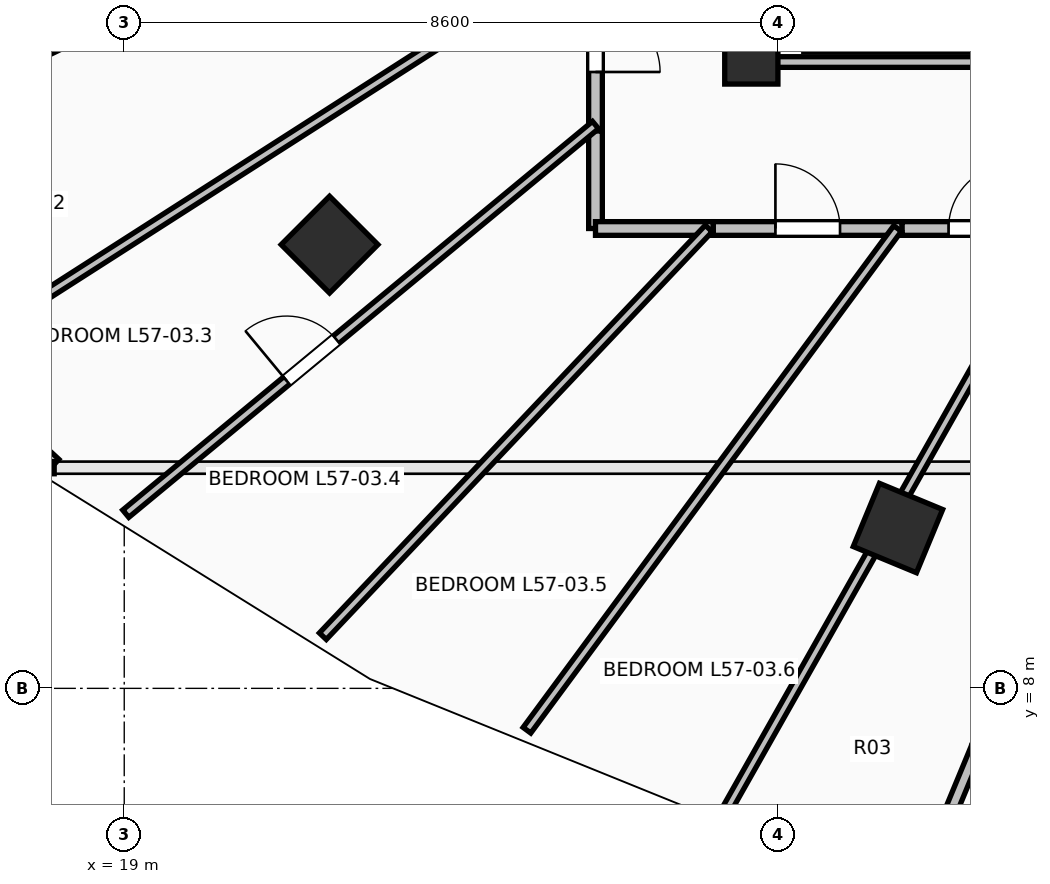
"""IFC4 building model, lengths in metres.
Left out: names, types, materials, properties, quantities, classifications, styles, units other than length and angle.
Written with IfcOpenShell. Run it as: python <this file> out.ifc"""

import sys

from ifc_helpers import new_model, si_unit, direction, frame, frame_2d, origin, origin_2d, place, context, subcontext, project, spatial, rectangle, extrude, element, fill, save


model = new_model("IFC4")
c1 = context("Model", 3, precision=1e-05, world=origin(), true_north=direction((0.0, 1.0)))
c2 = subcontext(c1, "Body", "Model", "MODEL_VIEW")
j1 = project(units=[si_unit("LENGTHUNIT", "METRE"), si_unit("PLANEANGLEUNIT", "RADIAN")], contexts=[c1])
p1 = place(None, origin())
s1 = spatial("IfcSite", under=j1, at=p1, CompositionType="ELEMENT")
p2 = place(p1, origin())
s2 = spatial("IfcBuilding", under=s1, at=p2, CompositionType="ELEMENT")
p3 = place(p2, frame((0.0, 0.0, 210.75)))
s3 = spatial("IfcBuildingStorey", under=s2, at=p3, CompositionType="ELEMENT", Elevation=210.75)
for number, where, z_axis, x_axis in (
    (1, (21.701, 13.838, 0.0), (0.0, 0.0, 1.0), (-0.707, -0.707, 0.0)),
    (2, (29.179, 10.109, 0.0), (0.0, 0.0, 1.0), (-0.383, -0.924, 0.0)),
):
    element("IfcColumn", number, at=place(p3, frame(where, z_axis=z_axis, x_axis=x_axis)), inside=s3, PredefinedType="COLUMN", context=c2, shape_type="SweptSolid", body=[
        extrude(rectangle(XDim=0.9, YDim=0.9, at=origin_2d()), origin(), (0.0, 0.0, 1.0), 3.55),
    ])
p4 = place(p3, frame((27.25, 16.45, 0.0), z_axis=(0.0, 0.0, 1.0), x_axis=(1.0, 0.0, 0.0)))
e3 = element("IfcColumn", 3, at=p4, inside=s3, PredefinedType="PILASTER", context=c2, shape_type="SweptSolid", body=[
    extrude(rectangle(XDim=0.7, YDim=1.0, at=origin_2d()), origin(), (0.0, 0.0, 1.0), 3.55),
])
p5 = place(p3, frame((14.528, 14.139, 0.0), z_axis=(0.0, 0.0, 1.0), x_axis=(0.735359993374, -0.677676678177, 0.0)))
e4 = element("IfcWall", 4, at=p5, inside=s3, PredefinedType="STANDARD", context=c2, shape_type="SweptSolid", body=[
    extrude(rectangle(XDim=4.774, YDim=0.3, at=frame_2d((2.387, 0.0))), origin(), (0.0, 0.0, 1.0), 3.29),
])
p6 = place(p5, frame((1.158, 0.0, 0.85)))
e5 = element("IfcOpeningElement", 5, at=p6, cuts=e4, PredefinedType="OPENING", context=c2, shape_type="SweptSolid", body=[
    extrude(rectangle(XDim=1.2, YDim=1.95, at=frame_2d((0.6, 0.975))), frame((0.0, 0.165, 0.0), z_axis=(0.0, -1.0, 0.0), x_axis=(1.0, 0.0, 0.0)), (0.0, 0.0, 1.0), 0.33),
])
p7 = place(p5, frame((3.195, 0.0, 0.85)))
e6 = element("IfcOpeningElement", 6, at=p7, cuts=e4, PredefinedType="OPENING", context=c2, shape_type="SweptSolid", body=[
    extrude(rectangle(XDim=1.2, YDim=1.95, at=frame_2d((0.6, 0.975))), frame((0.0, 0.165, 0.0), z_axis=(0.0, -1.0, 0.0), x_axis=(1.0, 0.0, 0.0)), (0.0, 0.0, 1.0), 0.33),
])
p8 = place(p3, frame((25.2, 17.735, 0.0), z_axis=(0.0, 0.0, 1.0), x_axis=(0.0, -1.0, 0.0)))
e7 = element("IfcWall", 7, at=p8, inside=s3, PredefinedType="PARTITIONING", context=c2, shape_type="SweptSolid", body=[
    extrude(rectangle(XDim=2.402, YDim=0.18, at=frame_2d((1.201, 0.0))), origin(), (0.0, 0.0, 1.0), 2.482),
])
p9 = place(p8, frame((0.776, 0.0, 0.0)))
e8 = element("IfcOpeningElement", 8, at=p9, cuts=e7, PredefinedType="OPENING", context=c2, shape_type="SweptSolid", body=[
    extrude(rectangle(XDim=0.85, YDim=2.1, at=frame_2d((0.425, 1.05))), frame((0.0, 0.105, 0.0), z_axis=(0.0, -1.0, 0.0), x_axis=(1.0, 0.0, 0.0)), (0.0, 0.0, 1.0), 0.21),
])
p10 = place(p3, frame((25.2, 15.333, 0.0), z_axis=(0.0, 0.0, 1.0), x_axis=(0.0, -1.0, 0.0)))
e9 = element("IfcWall", 9, at=p10, inside=s3, PredefinedType="PARTITIONING", context=c2, shape_type="SweptSolid", body=[
    extrude(rectangle(XDim=1.283, YDim=0.18, at=frame_2d((0.642, 0.0))), origin(), (0.0, 0.0, 1.0), 2.482),
])
p11 = place(p3, frame((25.2, 14.05, 0.0), z_axis=(0.0, 0.0, 1.0), x_axis=(1.0, 0.0, 0.0)))
e10 = element("IfcWall", 10, at=p11, inside=s3, PredefinedType="PARTITIONING", context=c2, shape_type="SweptSolid", body=[
    extrude(rectangle(XDim=1.55, YDim=0.18, at=frame_2d((0.775, 0.0))), origin(), (0.0, 0.0, 1.0), 2.936),
])
p12 = place(p3, frame((26.75, 14.05, 0.0), z_axis=(0.0, 0.0, 1.0), x_axis=(1.0, 0.0, 0.0)))
e11 = element("IfcWall", 11, at=p12, inside=s3, PredefinedType="PARTITIONING", context=c2, shape_type="SweptSolid", body=[
    extrude(rectangle(XDim=2.484, YDim=0.18, at=frame_2d((1.242, 0.0))), origin(), (0.0, 0.0, 1.0), 2.482),
])
p13 = place(p12, frame((0.817, 0.0, 0.0)))
e12 = element("IfcOpeningElement", 12, at=p13, cuts=e11, PredefinedType="OPENING", context=c2, shape_type="SweptSolid", body=[
    extrude(rectangle(XDim=0.85, YDim=2.1, at=frame_2d((0.425, 1.05))), frame((0.0, 0.105, 0.0), z_axis=(0.0, -1.0, 0.0), x_axis=(1.0, 0.0, 0.0)), (0.0, 0.0, 1.0), 0.21),
])
p14 = place(p3, frame((29.234, 14.05, 0.0), z_axis=(0.0, 0.0, 1.0), x_axis=(1.0, 0.0, 0.0)))
e13 = element("IfcWall", 13, at=p14, inside=s3, PredefinedType="PARTITIONING", context=c2, shape_type="SweptSolid", body=[
    extrude(rectangle(XDim=2.072, YDim=0.18, at=frame_2d((1.036, 0.0))), origin(), (0.0, 0.0, 1.0), 3.29),
])
p15 = place(p14, frame((0.611, 0.0, 0.0)))
e14 = element("IfcOpeningElement", 14, at=p15, cuts=e13, PredefinedType="OPENING", context=c2, shape_type="SweptSolid", body=[
    extrude(rectangle(XDim=0.85, YDim=2.1, at=frame_2d((0.425, 1.05))), frame((0.0, 0.105, 0.0), z_axis=(0.0, -1.0, 0.0), x_axis=(1.0, 0.0, 0.0)), (0.0, 0.0, 1.0), 0.21),
])
p16 = place(p3, frame((14.217, 14.579, 0.0), z_axis=(0.0, 0.0, 1.0), x_axis=(0.901423599975, 0.432938209689, 0.0)))
e15 = element("IfcWall", 15, at=p16, inside=s3, PredefinedType="PARTITIONING", context=c2, shape_type="SweptSolid", body=[
    extrude(rectangle(XDim=12.184, YDim=0.125, at=frame_2d((6.092, 0.0))), origin(), (0.0, 0.0, 1.0), 2.482),
])
p17 = place(p3, frame((16.555, 12.272, 0.0), z_axis=(0.0, 0.0, 1.0), x_axis=(0.842221721565, 0.539131312135, 0.0)))
e16 = element("IfcWall", 16, at=p17, inside=s3, PredefinedType="PARTITIONING", context=c2, shape_type="SweptSolid", body=[
    extrude(rectangle(XDim=10.265, YDim=0.125, at=frame_2d((5.132, 0.0))), origin(), (0.0, 0.0, 1.0), 2.482),
])
p18 = place(p3, frame((19.02, 10.298, 0.0), z_axis=(0.0, 0.0, 1.0), x_axis=(0.770494327523, 0.637446853671, 0.0)))
e17 = element("IfcWall", 17, at=p18, inside=s3, PredefinedType="PARTITIONING", context=c2, shape_type="SweptSolid", body=[
    extrude(rectangle(XDim=8.021, YDim=0.125, at=frame_2d((4.01, 0.0))), origin(), (0.0, 0.0, 1.0), 2.482),
])
p19 = place(p18, frame((2.746, 0.0, 0.0)))
e18 = element("IfcOpeningElement", 18, at=p19, cuts=e17, PredefinedType="OPENING", context=c2, shape_type="SweptSolid", body=[
    extrude(rectangle(XDim=0.85, YDim=2.1, at=frame_2d((0.425, 1.05))), frame((0.0, 0.077, 0.0), z_axis=(0.0, -1.0, 0.0), x_axis=(1.0, 0.0, 0.0)), (0.0, 0.0, 1.0), 0.155),
])
p20 = place(p3, frame((21.613, 8.686, 0.0), z_axis=(0.0, 0.0, 1.0), x_axis=(0.68740257318, 0.726276601844, 0.0)))
e19 = element("IfcWall", 19, at=p20, inside=s3, PredefinedType="PARTITIONING", context=c2, shape_type="SweptSolid", body=[
    extrude(rectangle(XDim=7.386, YDim=0.125, at=frame_2d((3.693, 0.0))), origin(), (0.0, 0.0, 1.0), 2.824),
])
p21 = place(p3, frame((24.298, 7.449, 0.0), z_axis=(0.0, 0.0, 1.0), x_axis=(0.594148459094, 0.804355399408, 0.0)))
e20 = element("IfcWall", 20, at=p21, inside=s3, PredefinedType="PARTITIONING", context=c2, shape_type="SweptSolid", body=[
    extrude(rectangle(XDim=8.207, YDim=0.125, at=frame_2d((4.103, 0.0))), origin(), (0.0, 0.0, 1.0), 2.482),
])
p22 = place(p3, frame((26.916, 6.389, 0.0), z_axis=(0.0, 0.0, 1.0), x_axis=(0.492046286697, 0.870569039047, 0.0)))
e21 = element("IfcWall", 21, at=p22, inside=s3, PredefinedType="PARTITIONING", context=c2, shape_type="SweptSolid", body=[
    extrude(rectangle(XDim=8.8, YDim=0.125, at=frame_2d((4.4, 0.0))), origin(), (0.0, 0.0, 1.0), 2.482),
])
p23 = place(p3, frame((29.602, 5.725, 0.0), z_axis=(0.0, 0.0, 1.0), x_axis=(0.382789247432, 0.923835695376, 0.0)))
e22 = element("IfcWall", 22, at=p23, inside=s3, PredefinedType="PARTITIONING", context=c2, shape_type="SweptSolid", body=[
    extrude(rectangle(XDim=1.643, YDim=0.16, at=frame_2d((0.822, 0.0))), origin(), (0.0, 0.0, 1.0), 3.29),
])
p24 = place(p3, frame((27.45, 23.754, 0.0), z_axis=(0.0, 0.0, 1.0), x_axis=(0.0, -1.0, 0.0)))
e23 = element("IfcWall", 23, at=p24, inside=s3, PredefinedType="PARTITIONING", context=c2, shape_type="SweptSolid", body=[
    extrude(rectangle(XDim=7.514, YDim=0.14, at=frame_2d((3.757, 0.0))), origin(), (0.0, 0.0, 1.0), 2.482),
])
p25 = place(p3, frame((27.45, 16.24, 0.0), z_axis=(0.0, 0.0, 1.0), x_axis=(1.0, 0.0, 0.0)))
e24 = element("IfcWall", 24, at=p25, inside=s3, PredefinedType="PARTITIONING", context=c2, shape_type="SweptSolid", body=[
    extrude(rectangle(XDim=3.745, YDim=0.14, at=frame_2d((1.873, 0.0))), origin(), (0.0, 0.0, 1.0), 2.482),
])
p26 = place(p9, origin())
e25 = element("IfcDoor", 25, at=p26, inside=s3, OperationType="SINGLE_SWING_RIGHT", PredefinedType="DOOR", context=c2, shape_type="SweptSolid", body=[
    extrude(rectangle(XDim=0.85, YDim=2.1, at=frame_2d((0.425, 1.05))), frame((0.0, 0.025, 0.0), z_axis=(0.0, -1.0, 0.0), x_axis=(1.0, 0.0, 0.0)), (0.0, 0.0, 1.0), 0.05),
])
fill(e8, e25)
p27 = place(p13, origin())
e26 = element("IfcDoor", 26, at=p27, inside=s3, OperationType="SINGLE_SWING_LEFT", PredefinedType="DOOR", context=c2, shape_type="SweptSolid", body=[
    extrude(rectangle(XDim=0.85, YDim=2.1, at=frame_2d((0.425, 1.05))), frame((0.0, 0.025, 0.0), z_axis=(0.0, -1.0, 0.0), x_axis=(1.0, 0.0, 0.0)), (0.0, 0.0, 1.0), 0.05),
])
fill(e12, e26)
p28 = place(p15, origin())
e27 = element("IfcDoor", 27, at=p28, inside=s3, OperationType="SINGLE_SWING_RIGHT", PredefinedType="DOOR", context=c2, shape_type="SweptSolid", body=[
    extrude(rectangle(XDim=0.85, YDim=2.1, at=frame_2d((0.425, 1.05))), frame((0.0, 0.025, 0.0), z_axis=(0.0, -1.0, 0.0), x_axis=(1.0, 0.0, 0.0)), (0.0, 0.0, 1.0), 0.05),
])
fill(e14, e27)
p29 = place(p19, origin())
e28 = element("IfcDoor", 28, at=p29, inside=s3, OperationType="SINGLE_SWING_LEFT", PredefinedType="DOOR", context=c2, shape_type="SweptSolid", body=[
    extrude(rectangle(XDim=0.85, YDim=2.1, at=frame_2d((0.425, 1.05))), frame((0.0, 0.025, 0.0), z_axis=(0.0, -1.0, 0.0), x_axis=(1.0, 0.0, 0.0)), (0.0, 0.0, 1.0), 0.05),
])
fill(e18, e28)
save(model, sys.argv[1])
